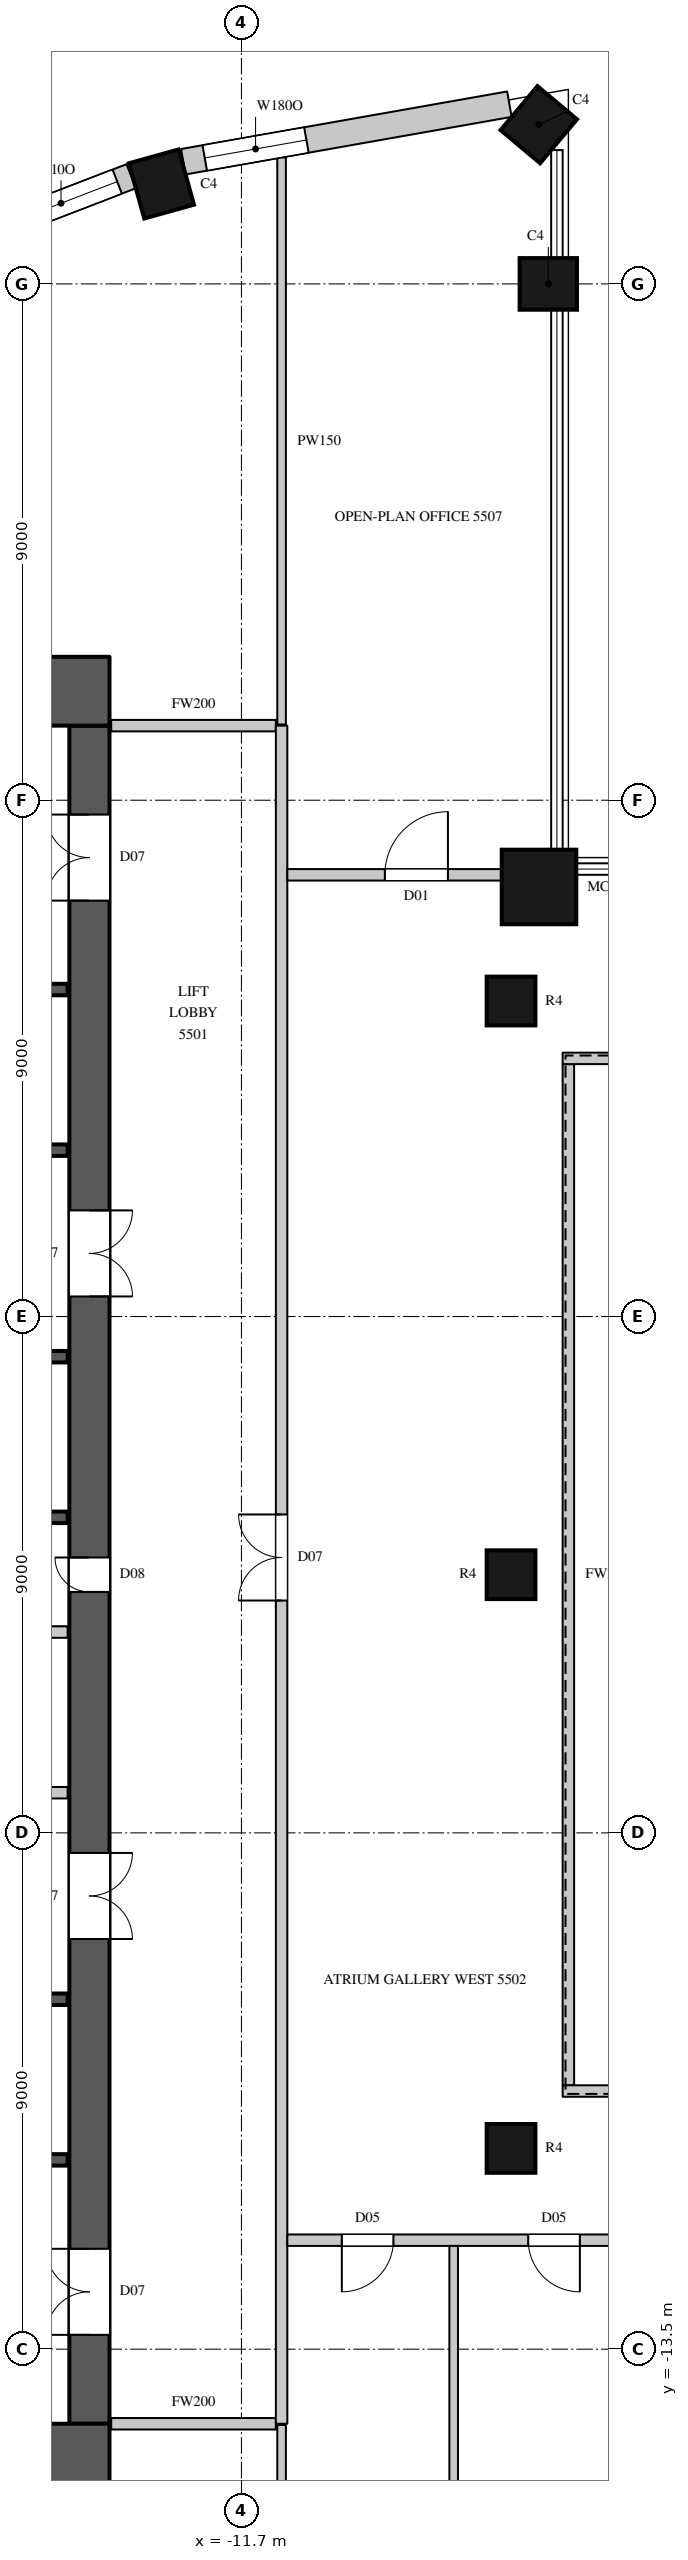
"""IFC4 building model, lengths in metres.
Left out: names, types, materials, properties, quantities, classifications, styles, units other than length and angle.
Written with IfcOpenShell. Run it as: python <this file> out.ifc"""

import sys

from ifc_helpers import new_model, si_unit, direction, frame, frame_2d, origin, origin_2d, place, context, subcontext, project, spatial, rectangle, circle, extrude, element, fill, save


model = new_model("IFC4")
c1 = context("Model", 3, precision=1e-05, world=origin(), true_north=direction((0.0, 1.0)))
c2 = subcontext(c1, "Body", "Model", "MODEL_VIEW")
j1 = project(units=[si_unit("LENGTHUNIT", "METRE"), si_unit("PLANEANGLEUNIT", "RADIAN")], contexts=[c1])
p1 = place(None, origin())
s1 = spatial("IfcSite", under=j1, at=p1, CompositionType="ELEMENT")
p2 = place(p1, origin())
s2 = spatial("IfcBuilding", under=s1, at=p2, CompositionType="ELEMENT")
p3 = place(p2, frame((0.0, 0.0, 247.5)))
s3 = spatial("IfcBuildingStorey", under=s2, at=p3, CompositionType="ELEMENT", Elevation=247.5)
p4 = place(p3, frame((-6.512, 11.988, 0.0), z_axis=(0.0, 0.0, 1.0), x_axis=(1.0, 0.0, 0.0)))
e1 = element("IfcColumn", 1, at=p4, inside=s3, PredefinedType="COLUMN", context=c2, shape_type="SweptSolid", body=[
    extrude(circle(Radius=0.65, at=origin_2d()), origin(), (0.0, 0.0, 1.0), 4.1),
])
for number, where, z_axis, x_axis in (
    (2, (-6.35, 22.5, 0.0), (0.0, 0.0, 1.0), (0.0, 1.0, 0.0)),
    (3, (-6.516, 25.275, 0.0), (0.0, 0.0, 1.0), (-0.766, 0.643, 0.0)),
    (4, (-13.095, 24.241, 0.0), (0.0, 0.0, 1.0), (-0.963, -0.268, 0.0)),
):
    element("IfcColumn", number, at=place(p3, frame(where, z_axis=z_axis, x_axis=x_axis)), inside=s3, PredefinedType="COLUMN", context=c2, shape_type="SweptSolid", body=[
        extrude(rectangle(XDim=0.9, YDim=1.0, at=origin_2d()), origin(), (0.0, 0.0, 1.0), 4.1),
    ])
for number, where, z_axis, x_axis in (
    (5, (-7.0, -10.0, 0.0), (0.0, 0.0, 1.0), (1.0, 0.0, 0.0)),
    (6, (-7.0, 0.0, 0.0), (0.0, 0.0, 1.0), (1.0, 0.0, 0.0)),
    (7, (-7.0, 10.0, 0.0), (0.0, 0.0, 1.0), (1.0, 0.0, 0.0)),
):
    element("IfcColumn", number, at=place(p3, frame(where, z_axis=z_axis, x_axis=x_axis)), inside=s3, PredefinedType="COLUMN", context=c2, shape_type="SweptSolid", body=[
        extrude(circle(Radius=0.425, at=origin_2d()), origin(), (0.0, 0.0, 1.0), 4.1),
    ])
p5 = place(p3, frame((-7.029, 25.632, 0.0), z_axis=(0.0, 0.0, 1.0), x_axis=(-0.984797606634, -0.173705710808, 0.0)))
e8 = element("IfcWall", 8, at=p5, inside=s3, PredefinedType="SOLIDWALL", context=c2, shape_type="SweptSolid", body=[
    extrude(rectangle(XDim=5.772, YDim=0.45, at=frame_2d((2.886, 0.0))), origin(), (0.0, 0.0, 1.0), 3.8),
])
p6 = place(p5, frame((3.593, 0.0, 1.05)))
e9 = element("IfcOpeningElement", 9, at=p6, cuts=e8, PredefinedType="OPENING", context=c2, shape_type="SweptSolid", body=[
    extrude(rectangle(XDim=1.8, YDim=2.4, at=frame_2d((0.9, 1.2))), frame((0.0, 0.235, 0.0), z_axis=(0.0, -1.0, 0.0), x_axis=(1.0, 0.0, 0.0)), (0.0, 0.0, 1.0), 0.47),
])
p7 = place(p3, frame((-13.622, 24.377, 0.0), z_axis=(0.0, 0.0, 1.0), x_axis=(-0.933129259679, -0.359541075164, 0.0)))
e10 = element("IfcWall", 10, at=p7, inside=s3, PredefinedType="SOLIDWALL", context=c2, shape_type="SweptSolid", body=[
    extrude(rectangle(XDim=6.054, YDim=0.45, at=frame_2d((3.027, 0.0))), origin(), (0.0, 0.0, 1.0), 3.8),
])
p8 = place(p7, frame((0.261, 0.0, 1.05)))
e11 = element("IfcOpeningElement", 11, at=p8, cuts=e10, PredefinedType="OPENING", context=c2, shape_type="SweptSolid", body=[
    extrude(rectangle(XDim=2.1, YDim=2.4, at=frame_2d((1.05, 1.2))), frame((0.0, 0.235, 0.0), z_axis=(0.0, -1.0, 0.0), x_axis=(1.0, 0.0, 0.0)), (0.0, 0.0, 1.0), 0.47),
])
for number, where, z_axis, x_axis in (
    (12, (-30.0, 15.4, 0.0), (0.0, 0.0, 1.0), (1.0, 0.0, 0.0)),
    (13, (-30.0, -15.4, 0.0), (0.0, 0.0, 1.0), (1.0, 0.0, 0.0)),
):
    element("IfcWall", number, at=place(p3, frame(where, z_axis=z_axis, x_axis=x_axis)), inside=s3, PredefinedType="SHEAR", context=c2, shape_type="SweptSolid", body=[
        extrude(rectangle(XDim=16.0, YDim=1.2, at=frame_2d((8.0, 0.0))), origin(), (0.0, 0.0, 1.0), 4.1),
    ])
p9 = place(p3, frame((-14.35, -14.8, 0.0), z_axis=(0.0, 0.0, 1.0), x_axis=(0.0, 1.0, 0.0)))
e14 = element("IfcWall", 14, at=p9, inside=s3, PredefinedType="SHEAR", context=c2, shape_type="SweptSolid", body=[
    extrude(rectangle(XDim=29.6, YDim=0.7, at=frame_2d((14.8, 0.0))), origin(), (0.0, 0.0, 1.0), 4.1),
])
p10 = place(p9, frame((1.55, 0.0, 0.0)))
e15 = element("IfcOpeningElement", 15, at=p10, cuts=e14, PredefinedType="OPENING", context=c2, shape_type="SweptSolid", body=[
    extrude(rectangle(XDim=1.5, YDim=2.4, at=frame_2d((0.75, 1.2))), frame((0.0, 0.36, 0.0), z_axis=(0.0, -1.0, 0.0), x_axis=(1.0, 0.0, 0.0)), (0.0, 0.0, 1.0), 0.72),
])
p11 = place(p9, frame((26.55, 0.0, 0.0)))
e16 = element("IfcOpeningElement", 16, at=p11, cuts=e14, PredefinedType="OPENING", context=c2, shape_type="SweptSolid", body=[
    extrude(rectangle(XDim=1.5, YDim=2.4, at=frame_2d((0.75, 1.2))), frame((0.0, 0.36, 0.0), z_axis=(0.0, -1.0, 0.0), x_axis=(1.0, 0.0, 0.0)), (0.0, 0.0, 1.0), 0.72),
])
p12 = place(p9, frame((8.45, 0.0, 0.0)))
e17 = element("IfcOpeningElement", 17, at=p12, cuts=e14, PredefinedType="OPENING", context=c2, shape_type="SweptSolid", body=[
    extrude(rectangle(XDim=1.5, YDim=2.4, at=frame_2d((0.75, 1.2))), frame((0.0, 0.36, 0.0), z_axis=(0.0, -1.0, 0.0), x_axis=(1.0, 0.0, 0.0)), (0.0, 0.0, 1.0), 0.72),
])
p13 = place(p9, frame((19.65, 0.0, 0.0)))
e18 = element("IfcOpeningElement", 18, at=p13, cuts=e14, PredefinedType="OPENING", context=c2, shape_type="SweptSolid", body=[
    extrude(rectangle(XDim=1.5, YDim=2.4, at=frame_2d((0.75, 1.2))), frame((0.0, 0.36, 0.0), z_axis=(0.0, -1.0, 0.0), x_axis=(1.0, 0.0, 0.0)), (0.0, 0.0, 1.0), 0.72),
])
p14 = place(p9, frame((14.5, 0.0, 0.0)))
e19 = element("IfcOpeningElement", 19, at=p14, cuts=e14, PredefinedType="OPENING", context=c2, shape_type="SweptSolid", body=[
    extrude(rectangle(XDim=0.6, YDim=2.0, at=frame_2d((0.3, 1.0))), frame((0.0, 0.36, 0.0), z_axis=(0.0, -1.0, 0.0), x_axis=(1.0, 0.0, 0.0)), (0.0, 0.0, 1.0), 0.72),
])
p15 = place(p3, frame((-21.38, -3.8, 0.0), z_axis=(0.0, 0.0, 1.0), x_axis=(1.0, 0.0, 0.0)))
e20 = element("IfcWall", 20, at=p15, inside=s3, PredefinedType="PARTITIONING", context=c2, shape_type="SweptSolid", body=[
    extrude(rectangle(XDim=6.65, YDim=0.2, at=frame_2d((3.325, 0.0))), origin(), (0.0, 0.0, 1.0), 3.8),
])
p16 = place(p15, frame((2.9, 0.0, 0.0)))
e21 = element("IfcOpeningElement", 21, at=p16, cuts=e20, PredefinedType="OPENING", context=c2, shape_type="SweptSolid", body=[
    extrude(rectangle(XDim=0.9, YDim=2.2, at=frame_2d((0.45, 1.1))), frame((0.0, 0.11, 0.0), z_axis=(0.0, -1.0, 0.0), x_axis=(1.0, 0.0, 0.0)), (0.0, 0.0, 1.0), 0.22),
])
for number, where, z_axis, x_axis in (
    (22, (-13.97, -14.8, 0.0), (0.0, 0.0, 1.0), (1.0, 0.0, 0.0)),
    (23, (-13.97, 14.8, 0.0), (0.0, 0.0, 1.0), (1.0, 0.0, 0.0)),
):
    element("IfcWall", number, at=place(p3, frame(where, z_axis=z_axis, x_axis=x_axis)), inside=s3, PredefinedType="PARTITIONING", context=c2, shape_type="SweptSolid", body=[
        extrude(rectangle(XDim=2.87, YDim=0.2, at=frame_2d((1.435, 0.0))), origin(), (0.0, 0.0, 1.0), 3.8),
    ])
p17 = place(p3, frame((-11.0, -14.8, 0.0), z_axis=(0.0, 0.0, 1.0), x_axis=(0.0, 1.0, 0.0)))
e24 = element("IfcWall", 24, at=p17, inside=s3, PredefinedType="PARTITIONING", context=c2, shape_type="SweptSolid", body=[
    extrude(rectangle(XDim=29.6, YDim=0.2, at=frame_2d((14.8, 0.0))), origin(), (0.0, 0.0, 1.0), 3.8),
])
p18 = place(p17, frame((14.35, 0.0, 0.0)))
e25 = element("IfcOpeningElement", 25, at=p18, cuts=e24, PredefinedType="OPENING", context=c2, shape_type="SweptSolid", body=[
    extrude(rectangle(XDim=1.5, YDim=2.4, at=frame_2d((0.75, 1.2))), frame((0.0, 0.11, 0.0), z_axis=(0.0, -1.0, 0.0), x_axis=(1.0, 0.0, 0.0)), (0.0, 0.0, 1.0), 0.22),
])
p19 = place(p3, frame((-10.9, -11.6, 0.0), z_axis=(0.0, 0.0, 1.0), x_axis=(1.0, 0.0, 0.0)))
e26 = element("IfcWall", 26, at=p19, inside=s3, PredefinedType="PARTITIONING", context=c2, shape_type="SweptSolid", body=[
    extrude(rectangle(XDim=21.4, YDim=0.2, at=frame_2d((10.7, 0.0))), origin(), (0.0, 0.0, 1.0), 3.8),
])
p20 = place(p19, frame((0.95, 0.0, 0.0)))
e27 = element("IfcOpeningElement", 27, at=p20, cuts=e26, PredefinedType="OPENING", context=c2, shape_type="SweptSolid", body=[
    extrude(rectangle(XDim=0.9, YDim=2.2, at=frame_2d((0.45, 1.1))), frame((0.0, 0.11, 0.0), z_axis=(0.0, -1.0, 0.0), x_axis=(1.0, 0.0, 0.0)), (0.0, 0.0, 1.0), 0.22),
])
p21 = place(p19, frame((4.2, 0.0, 0.0)))
e28 = element("IfcOpeningElement", 28, at=p21, cuts=e26, PredefinedType="OPENING", context=c2, shape_type="SweptSolid", body=[
    extrude(rectangle(XDim=0.9, YDim=2.2, at=frame_2d((0.45, 1.1))), frame((0.0, 0.11, 0.0), z_axis=(0.0, -1.0, 0.0), x_axis=(1.0, 0.0, 0.0)), (0.0, 0.0, 1.0), 0.22),
])
p22 = place(p19, frame((6.85, 0.0, 0.0)))
e29 = element("IfcOpeningElement", 29, at=p22, cuts=e26, PredefinedType="OPENING", context=c2, shape_type="SweptSolid", body=[
    extrude(rectangle(XDim=1.1, YDim=2.4, at=frame_2d((0.55, 1.2))), frame((0.0, 0.11, 0.0), z_axis=(0.0, -1.0, 0.0), x_axis=(1.0, 0.0, 0.0)), (0.0, 0.0, 1.0), 0.22),
])
p23 = place(p19, frame((9.8, 0.0, 0.0)))
e30 = element("IfcOpeningElement", 30, at=p23, cuts=e26, PredefinedType="OPENING", context=c2, shape_type="SweptSolid", body=[
    extrude(rectangle(XDim=1.1, YDim=2.4, at=frame_2d((0.55, 1.2))), frame((0.0, 0.11, 0.0), z_axis=(0.0, -1.0, 0.0), x_axis=(1.0, 0.0, 0.0)), (0.0, 0.0, 1.0), 0.22),
])
p24 = place(p3, frame((-10.9, 12.2, 0.0), z_axis=(0.0, 0.0, 1.0), x_axis=(1.0, 0.0, 0.0)))
e31 = element("IfcWall", 31, at=p24, inside=s3, PredefinedType="PARTITIONING", context=c2, shape_type="SweptSolid", body=[
    extrude(rectangle(XDim=3.756, YDim=0.2, at=frame_2d((1.878, 0.0))), origin(), (0.0, 0.0, 1.0), 3.8),
])
p25 = place(p24, frame((1.7, 0.0, 0.0)))
e32 = element("IfcOpeningElement", 32, at=p25, cuts=e31, PredefinedType="OPENING", context=c2, shape_type="SweptSolid", body=[
    extrude(rectangle(XDim=1.1, YDim=2.4, at=frame_2d((0.55, 1.2))), frame((0.0, 0.11, 0.0), z_axis=(0.0, -1.0, 0.0), x_axis=(1.0, 0.0, 0.0)), (0.0, 0.0, 1.0), 0.22),
])
p26 = place(p3, frame((-6.0, -8.9, 0.0), z_axis=(0.0, 0.0, 1.0), x_axis=(0.0, 1.0, 0.0)))
e33 = element("IfcWall", 33, at=p26, inside=s3, PredefinedType="PARTITIONING", context=c2, shape_type="SweptSolid", body=[
    extrude(rectangle(XDim=17.8, YDim=0.2, at=frame_2d((8.9, 0.0))), origin(), (0.0, 0.0, 1.0), 3.8),
])
for number, where, z_axis, x_axis in (
    (34, (-6.1, -9.0, 0.0), (0.0, 0.0, 1.0), (1.0, 0.0, 0.0)),
    (35, (-6.1, 9.0, 0.0), (0.0, 0.0, 1.0), (1.0, 0.0, 0.0)),
):
    element("IfcWall", number, at=place(p3, frame(where, z_axis=z_axis, x_axis=x_axis)), inside=s3, PredefinedType="PARTITIONING", context=c2, shape_type="SweptSolid", body=[
        extrude(rectangle(XDim=7.08, YDim=0.2, at=frame_2d((3.54, 0.0))), origin(), (0.0, 0.0, 1.0), 3.8),
    ])
p27 = place(p3, frame((-11.0, -23.757, 0.0), z_axis=(0.0, 0.0, 1.0), x_axis=(0.0, 1.0, 0.0)))
e36 = element("IfcWall", 36, at=p27, inside=s3, PredefinedType="PARTITIONING", context=c2, shape_type="SweptSolid", body=[
    extrude(rectangle(XDim=8.937, YDim=0.15, at=frame_2d((4.468, 0.0))), origin(), (0.0, 0.0, 1.0), 3.8),
])
p28 = place(p3, frame((-11.0, 14.82, 0.0), z_axis=(0.0, 0.0, 1.0), x_axis=(0.0, 1.0, 0.0)))
e37 = element("IfcWall", 37, at=p28, inside=s3, PredefinedType="PARTITIONING", context=c2, shape_type="SweptSolid", body=[
    extrude(rectangle(XDim=9.883, YDim=0.15, at=frame_2d((4.942, 0.0))), origin(), (0.0, 0.0, 1.0), 3.8),
])
p29 = place(p3, frame((-8.0, -24.04, 0.0), z_axis=(0.0, 0.0, 1.0), x_axis=(0.0, 1.0, 0.0)))
e38 = element("IfcWall", 38, at=p29, inside=s3, PredefinedType="PARTITIONING", context=c2, shape_type="SweptSolid", body=[
    extrude(rectangle(XDim=12.34, YDim=0.15, at=frame_2d((6.17, 0.0))), origin(), (0.0, 0.0, 1.0), 3.8),
])
p30 = place(p3, frame((-29.27, -1.0, 0.0), z_axis=(0.0, 0.0, 1.0), x_axis=(1.0, 0.0, 0.0)))
e39 = element("IfcWall", 39, at=p30, inside=s3, PredefinedType="PARTITIONING", context=c2, shape_type="SweptSolid", body=[
    extrude(rectangle(XDim=14.54, YDim=0.2, at=frame_2d((7.27, 0.0))), origin(), (0.0, 0.0, 1.0), 3.8),
])
p31 = place(p3, frame((-17.92, -10.2, 0.0), z_axis=(0.0, 0.0, 1.0), x_axis=(1.0, 0.0, 0.0)))
e40 = element("IfcWall", 40, at=p31, inside=s3, PredefinedType="SHEAR", context=c2, shape_type="SweptSolid", body=[
    extrude(rectangle(XDim=3.19, YDim=0.2, at=frame_2d((1.595, 0.0))), origin(), (0.0, 0.0, 1.0), 3.8),
])
p32 = place(p31, frame((1.05, 0.0, 0.0)))
e41 = element("IfcOpeningElement", 41, at=p32, cuts=e40, PredefinedType="OPENING", context=c2, shape_type="SweptSolid", body=[
    extrude(rectangle(XDim=1.1, YDim=2.2, at=frame_2d((0.55, 1.1))), frame((0.0, 0.11, 0.0), z_axis=(0.0, -1.0, 0.0), x_axis=(1.0, 0.0, 0.0)), (0.0, 0.0, 1.0), 0.22),
])
for number, where, z_axis, x_axis in (
    (42, (-17.9, -7.4, 0.0), (0.0, 0.0, 1.0), (1.0, 0.0, 0.0)),
    (43, (-17.9, 1.0, 0.0), (0.0, 0.0, 1.0), (1.0, 0.0, 0.0)),
):
    element("IfcWall", number, at=place(p3, frame(where, z_axis=z_axis, x_axis=x_axis)), inside=s3, PredefinedType="SHEAR", context=c2, shape_type="SweptSolid", body=[
        extrude(rectangle(XDim=3.17, YDim=0.2, at=frame_2d((1.585, 0.0))), origin(), (0.0, 0.0, 1.0), 3.8),
    ])
p33 = place(p3, frame((-17.9, 3.8, 0.0), z_axis=(0.0, 0.0, 1.0), x_axis=(1.0, 0.0, 0.0)))
e44 = element("IfcWall", 44, at=p33, inside=s3, PredefinedType="SHEAR", context=c2, shape_type="SweptSolid", body=[
    extrude(rectangle(XDim=3.17, YDim=0.2, at=frame_2d((1.585, 0.0))), origin(), (0.0, 0.0, 1.0), 3.8),
])
p34 = place(p33, frame((1.05, 0.0, 0.0)))
e45 = element("IfcOpeningElement", 45, at=p34, cuts=e44, PredefinedType="OPENING", context=c2, shape_type="SweptSolid", body=[
    extrude(rectangle(XDim=1.1, YDim=2.2, at=frame_2d((0.55, 1.1))), frame((0.0, 0.11, 0.0), z_axis=(0.0, -1.0, 0.0), x_axis=(1.0, 0.0, 0.0)), (0.0, 0.0, 1.0), 0.22),
])
p35 = place(p3, frame((-17.92, 7.4, 0.0), z_axis=(0.0, 0.0, 1.0), x_axis=(1.0, 0.0, 0.0)))
e46 = element("IfcWall", 46, at=p35, inside=s3, PredefinedType="SHEAR", context=c2, shape_type="SweptSolid", body=[
    extrude(rectangle(XDim=3.19, YDim=0.2, at=frame_2d((1.595, 0.0))), origin(), (0.0, 0.0, 1.0), 3.8),
])
p36 = place(p3, frame((-17.92, 10.2, 0.0), z_axis=(0.0, 0.0, 1.0), x_axis=(1.0, 0.0, 0.0)))
e47 = element("IfcWall", 47, at=p36, inside=s3, PredefinedType="SHEAR", context=c2, shape_type="SweptSolid", body=[
    extrude(rectangle(XDim=3.19, YDim=0.2, at=frame_2d((1.595, 0.0))), origin(), (0.0, 0.0, 1.0), 3.8),
])
p37 = place(p36, frame((1.05, 0.0, 0.0)))
e48 = element("IfcOpeningElement", 48, at=p37, cuts=e47, PredefinedType="OPENING", context=c2, shape_type="SweptSolid", body=[
    extrude(rectangle(XDim=1.1, YDim=2.2, at=frame_2d((0.55, 1.1))), frame((0.0, 0.11, 0.0), z_axis=(0.0, -1.0, 0.0), x_axis=(1.0, 0.0, 0.0)), (0.0, 0.0, 1.0), 0.22),
])
p38 = place(p6, origin())
e49 = element("IfcWindow", 49, at=p38, inside=s3, PartitioningType="SINGLE_PANEL", PredefinedType="WINDOW", context=c2, shape_type="SweptSolid", body=[
    extrude(rectangle(XDim=1.8, YDim=2.4, at=frame_2d((0.9, 1.2))), frame((0.0, 0.135, 0.0), z_axis=(0.0, -1.0, 0.0), x_axis=(1.0, 0.0, 0.0)), (0.0, 0.0, 1.0), 0.06),
])
fill(e9, e49)
p39 = place(p8, origin())
e50 = element("IfcWindow", 50, at=p39, inside=s3, PartitioningType="SINGLE_PANEL", PredefinedType="WINDOW", context=c2, shape_type="SweptSolid", body=[
    extrude(rectangle(XDim=2.1, YDim=2.4, at=frame_2d((1.05, 1.2))), frame((0.0, 0.135, 0.0), z_axis=(0.0, -1.0, 0.0), x_axis=(1.0, 0.0, 0.0)), (0.0, 0.0, 1.0), 0.06),
])
fill(e11, e50)
p40 = place(p18, origin())
e51 = element("IfcDoor", 51, at=p40, inside=s3, OperationType="DOUBLE_DOOR_SINGLE_SWING", PredefinedType="DOOR", context=c2, shape_type="SweptSolid", body=[
    extrude(rectangle(XDim=1.5, YDim=2.4, at=frame_2d((0.75, 1.2))), frame((0.0, 0.025, 0.0), z_axis=(0.0, -1.0, 0.0), x_axis=(1.0, 0.0, 0.0)), (0.0, 0.0, 1.0), 0.05),
])
fill(e25, e51)
p41 = place(p20, origin())
e52 = element("IfcDoor", 52, at=p41, inside=s3, OperationType="SINGLE_SWING_RIGHT", PredefinedType="DOOR", context=c2, shape_type="SweptSolid", body=[
    extrude(rectangle(XDim=0.9, YDim=2.2, at=frame_2d((0.45, 1.1))), frame((0.0, 0.025, 0.0), z_axis=(0.0, -1.0, 0.0), x_axis=(1.0, 0.0, 0.0)), (0.0, 0.0, 1.0), 0.05),
])
fill(e27, e52)
p42 = place(p21, origin())
e53 = element("IfcDoor", 53, at=p42, inside=s3, OperationType="SINGLE_SWING_LEFT", PredefinedType="DOOR", context=c2, shape_type="SweptSolid", body=[
    extrude(rectangle(XDim=0.9, YDim=2.2, at=frame_2d((0.45, 1.1))), frame((0.0, 0.025, 0.0), z_axis=(0.0, -1.0, 0.0), x_axis=(1.0, 0.0, 0.0)), (0.0, 0.0, 1.0), 0.05),
])
fill(e28, e53)
p43 = place(p25, origin())
e54 = element("IfcDoor", 54, at=p43, inside=s3, OperationType="SINGLE_SWING_RIGHT", PredefinedType="DOOR", context=c2, shape_type="SweptSolid", body=[
    extrude(rectangle(XDim=1.1, YDim=2.4, at=frame_2d((0.55, 1.2))), frame((0.0, 0.025, 0.0), z_axis=(0.0, -1.0, 0.0), x_axis=(1.0, 0.0, 0.0)), (0.0, 0.0, 1.0), 0.05),
])
fill(e32, e54)
p44 = place(p10, origin())
e55 = element("IfcDoor", 55, at=p44, inside=s3, OperationType="DOUBLE_DOOR_SINGLE_SWING", PredefinedType="DOOR", context=c2, shape_type="SweptSolid", body=[
    extrude(rectangle(XDim=1.5, YDim=2.4, at=frame_2d((0.75, 1.2))), frame((0.0, 0.345, 0.0), z_axis=(0.0, -1.0, 0.0), x_axis=(1.0, 0.0, 0.0)), (0.0, 0.0, 1.0), 0.05),
])
fill(e15, e55)
p45 = place(p11, origin())
e56 = element("IfcDoor", 56, at=p45, inside=s3, OperationType="DOUBLE_DOOR_SINGLE_SWING", PredefinedType="DOOR", context=c2, shape_type="SweptSolid", body=[
    extrude(rectangle(XDim=1.5, YDim=2.4, at=frame_2d((0.75, 1.2))), frame((0.0, 0.345, 0.0), z_axis=(0.0, -1.0, 0.0), x_axis=(1.0, 0.0, 0.0)), (0.0, 0.0, 1.0), 0.05),
])
fill(e16, e56)
p46 = place(p12, origin())
e57 = element("IfcDoor", 57, at=p46, inside=s3, OperationType="DOUBLE_DOOR_SINGLE_SWING", PredefinedType="DOOR", context=c2, shape_type="SweptSolid", body=[
    extrude(rectangle(XDim=1.5, YDim=2.4, at=frame_2d((0.75, 1.2))), frame((0.0, -0.295, 0.0), z_axis=(0.0, -1.0, 0.0), x_axis=(1.0, 0.0, 0.0)), (0.0, 0.0, 1.0), 0.05),
])
fill(e17, e57)
p47 = place(p13, origin())
e58 = element("IfcDoor", 58, at=p47, inside=s3, OperationType="DOUBLE_DOOR_SINGLE_SWING", PredefinedType="DOOR", context=c2, shape_type="SweptSolid", body=[
    extrude(rectangle(XDim=1.5, YDim=2.4, at=frame_2d((0.75, 1.2))), frame((0.0, -0.295, 0.0), z_axis=(0.0, -1.0, 0.0), x_axis=(1.0, 0.0, 0.0)), (0.0, 0.0, 1.0), 0.05),
])
fill(e18, e58)
p48 = place(p14, origin())
e59 = element("IfcDoor", 59, at=p48, inside=s3, OperationType="SINGLE_SWING_RIGHT", PredefinedType="DOOR", context=c2, shape_type="SweptSolid", body=[
    extrude(rectangle(XDim=0.6, YDim=2.0, at=frame_2d((0.3, 1.0))), frame((0.0, 0.345, 0.0), z_axis=(0.0, -1.0, 0.0), x_axis=(1.0, 0.0, 0.0)), (0.0, 0.0, 1.0), 0.05),
])
fill(e19, e59)
save(model, sys.argv[1])
